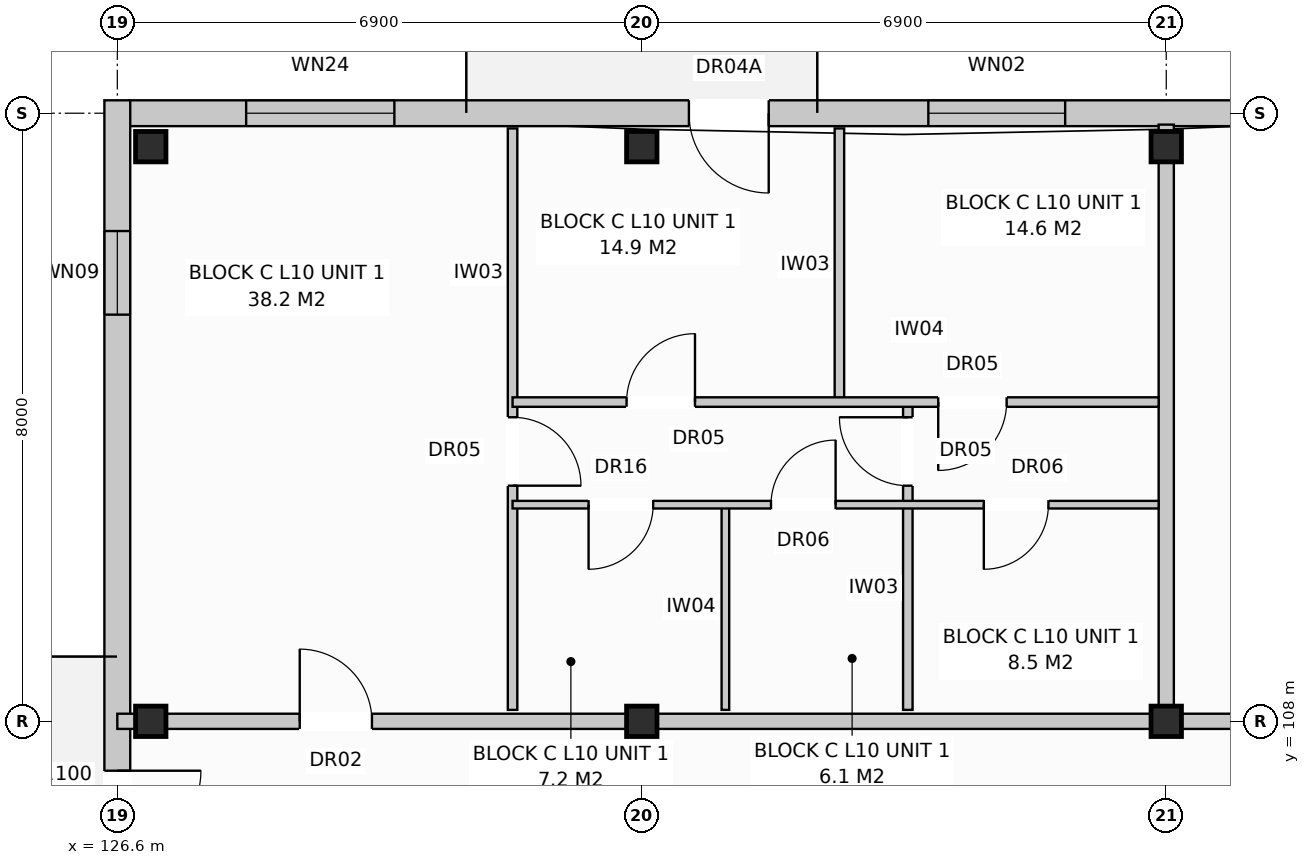
"""IFC4 building model, lengths in metres.
Left out: names, types, materials, properties, quantities, classifications, styles, units other than length and angle.
Written with IfcOpenShell. Run it as: python <this file> out.ifc"""

import sys

from ifc_helpers import new_model, si_unit, direction, frame, frame_2d, origin, origin_with_axes, origin_2d, place, context, subcontext, project, spatial, rectangle, extrude, element, fill, save


model = new_model("IFC4")
c1 = context("Model", 3, precision=1e-05, world=origin(), true_north=direction((0.0, 1.0)))
c2 = subcontext(c1, "Body", "Model", "MODEL_VIEW")
j1 = project(units=[si_unit("LENGTHUNIT", "METRE"), si_unit("PLANEANGLEUNIT", "RADIAN")], contexts=[c1])
p1 = place(None, origin())
s1 = spatial("IfcSite", under=j1, at=p1, CompositionType="ELEMENT")
p2 = place(p1, origin())
s2 = spatial("IfcBuilding", under=s1, at=p2, CompositionType="ELEMENT")
p3 = place(p2, frame((0.0, 0.0, 33.6)))
s3 = spatial("IfcBuildingStorey", under=s2, at=p3, CompositionType="ELEMENT", Elevation=33.6)
for number, where, z_axis, x_axis in (
    (1, (127.04, 108.0, 0.0), (0.0, 0.0, 1.0), (1.0, 0.0, 0.0)),
    (2, (127.04, 115.56, 0.0), (0.0, 0.0, 1.0), (1.0, 0.0, 0.0)),
    (3, (133.5, 108.0, 0.0), (0.0, 0.0, 1.0), (1.0, 0.0, 0.0)),
    (4, (133.5, 115.56, 0.0), (0.0, 0.0, 1.0), (1.0, 0.0, 0.0)),
    (5, (140.4, 108.0, 0.0), (0.0, 0.0, 1.0), (1.0, 0.0, 0.0)),
    (6, (140.4, 115.56, 0.0), (0.0, 0.0, 1.0), (1.0, 0.0, 0.0)),
):
    element("IfcColumn", number, at=place(p3, frame(where, z_axis=z_axis, x_axis=x_axis)), inside=s3, PredefinedType="COLUMN", context=c2, shape_type="SweptSolid", body=[
        extrude(rectangle(XDim=0.4, YDim=0.4, at=origin_2d()), origin(), (0.0, 0.0, 1.0), 3.2),
    ])
p4 = place(p3, frame((126.76, 116.0, 0.0), z_axis=(0.0, 0.0, 1.0), x_axis=(1.0, 0.0, 0.0)))
e7 = element("IfcWall", 7, at=p4, inside=s3, PredefinedType="STANDARD", context=c2, shape_type="SweptSolid", body=[
    extrude(rectangle(XDim=41.08, YDim=0.34, at=frame_2d((20.54, 0.0))), origin(), (0.0, 0.0, 1.0), 2.91),
])
p5 = place(p4, frame((7.36, 0.0, 0.0)))
e8 = element("IfcOpeningElement", 8, at=p5, cuts=e7, PredefinedType="OPENING", context=c2, shape_type="SweptSolid", body=[
    extrude(rectangle(XDim=1.05, YDim=2.12, at=frame_2d((0.525, 1.06))), frame((0.0, 0.182, 0.0), z_axis=(0.0, -1.0, 0.0), x_axis=(1.0, 0.0, 0.0)), (0.0, 0.0, 1.0), 0.364),
])
p6 = place(p4, frame((18.651, 0.0, 0.0)))
e9 = element("IfcOpeningElement", 9, at=p6, cuts=e7, PredefinedType="OPENING", context=c2, shape_type="SweptSolid", body=[
    extrude(rectangle(XDim=1.05, YDim=2.12, at=frame_2d((0.525, 1.06))), frame((0.0, 0.182, 0.0), z_axis=(0.0, -1.0, 0.0), x_axis=(1.0, 0.0, 0.0)), (0.0, 0.0, 1.0), 0.364),
])
p7 = place(p4, frame((32.651, 0.0, 0.0)))
e10 = element("IfcOpeningElement", 10, at=p7, cuts=e7, PredefinedType="OPENING", context=c2, shape_type="SweptSolid", body=[
    extrude(rectangle(XDim=1.05, YDim=2.12, at=frame_2d((0.525, 1.06))), frame((0.0, 0.182, 0.0), z_axis=(0.0, -1.0, 0.0), x_axis=(1.0, 0.0, 0.0)), (0.0, 0.0, 1.0), 0.364),
])
p8 = place(p4, frame((1.535, 0.0, 0.8)))
e11 = element("IfcOpeningElement", 11, at=p8, cuts=e7, PredefinedType="OPENING", context=c2, shape_type="SweptSolid", body=[
    extrude(rectangle(XDim=1.95, YDim=1.65, at=frame_2d((0.975, 0.825))), frame((0.0, 0.182, 0.0), z_axis=(0.0, -1.0, 0.0), x_axis=(1.0, 0.0, 0.0)), (0.0, 0.0, 1.0), 0.364),
])
p9 = place(p4, frame((10.51, 0.0, 0.8)))
e12 = element("IfcOpeningElement", 12, at=p9, cuts=e7, PredefinedType="OPENING", context=c2, shape_type="SweptSolid", body=[
    extrude(rectangle(XDim=1.8, YDim=1.7, at=frame_2d((0.9, 0.85))), frame((0.0, 0.182, 0.0), z_axis=(0.0, -1.0, 0.0), x_axis=(1.0, 0.0, 0.0)), (0.0, 0.0, 1.0), 0.364),
])
p10 = place(p4, frame((15.86, 0.0, 0.8)))
e13 = element("IfcOpeningElement", 13, at=p10, cuts=e7, PredefinedType="OPENING", context=c2, shape_type="SweptSolid", body=[
    extrude(rectangle(XDim=1.9, YDim=1.85, at=frame_2d((0.95, 0.925))), frame((0.0, 0.182, 0.0), z_axis=(0.0, -1.0, 0.0), x_axis=(1.0, 0.0, 0.0)), (0.0, 0.0, 1.0), 0.364),
])
p11 = place(p4, frame((21.96, 0.0, 0.72)))
e14 = element("IfcOpeningElement", 14, at=p11, cuts=e7, PredefinedType="OPENING", context=c2, shape_type="SweptSolid", body=[
    extrude(rectangle(XDim=1.1, YDim=1.5, at=frame_2d((0.55, 0.75))), frame((0.0, 0.182, 0.0), z_axis=(0.0, -1.0, 0.0), x_axis=(1.0, 0.0, 0.0)), (0.0, 0.0, 1.0), 0.364),
])
p12 = place(p4, frame((28.01, 0.0, 0.8)))
e15 = element("IfcOpeningElement", 15, at=p12, cuts=e7, PredefinedType="OPENING", context=c2, shape_type="SweptSolid", body=[
    extrude(rectangle(XDim=1.8, YDim=1.7, at=frame_2d((0.9, 0.85))), frame((0.0, 0.182, 0.0), z_axis=(0.0, -1.0, 0.0), x_axis=(1.0, 0.0, 0.0)), (0.0, 0.0, 1.0), 0.364),
])
p13 = place(p4, frame((30.81, 0.0, 0.85)))
e16 = element("IfcOpeningElement", 16, at=p13, cuts=e7, PredefinedType="OPENING", context=c2, shape_type="SweptSolid", body=[
    extrude(rectangle(XDim=1.5, YDim=1.65, at=frame_2d((0.75, 0.825))), frame((0.0, 0.182, 0.0), z_axis=(0.0, -1.0, 0.0), x_axis=(1.0, 0.0, 0.0)), (0.0, 0.0, 1.0), 0.364),
])
p14 = place(p4, frame((35.76, 0.0, 0.72)))
e17 = element("IfcOpeningElement", 17, at=p14, cuts=e7, PredefinedType="OPENING", context=c2, shape_type="SweptSolid", body=[
    extrude(rectangle(XDim=1.1, YDim=1.5, at=frame_2d((0.55, 0.75))), frame((0.0, 0.182, 0.0), z_axis=(0.0, -1.0, 0.0), x_axis=(1.0, 0.0, 0.0)), (0.0, 0.0, 1.0), 0.364),
])
p15 = place(p4, frame((38.675, 0.0, 0.8)))
e18 = element("IfcOpeningElement", 18, at=p15, cuts=e7, PredefinedType="OPENING", context=c2, shape_type="SweptSolid", body=[
    extrude(rectangle(XDim=1.8, YDim=1.7, at=frame_2d((0.9, 0.85))), frame((0.0, 0.182, 0.0), z_axis=(0.0, -1.0, 0.0), x_axis=(1.0, 0.0, 0.0)), (0.0, 0.0, 1.0), 0.364),
])
p16 = place(p3, frame((126.6, 97.43, 0.0), z_axis=(0.0, 0.0, 1.0), x_axis=(0.0, 1.0, 0.0)))
e19 = element("IfcWall", 19, at=p16, inside=s3, PredefinedType="STANDARD", context=c2, shape_type="SweptSolid", body=[
    extrude(rectangle(XDim=18.74, YDim=0.34, at=frame_2d((9.37, 0.0))), origin(), (0.0, 0.0, 1.0), 2.91),
])
p17 = place(p16, frame((8.82, 0.0, 0.0)))
e20 = element("IfcOpeningElement", 20, at=p17, cuts=e19, PredefinedType="OPENING", context=c2, shape_type="SweptSolid", body=[
    extrude(rectangle(XDim=1.1, YDim=2.1, at=frame_2d((0.55, 1.05))), frame((0.0, 0.182, 0.0), z_axis=(0.0, -1.0, 0.0), x_axis=(1.0, 0.0, 0.0)), (0.0, 0.0, 1.0), 0.364),
])
p18 = place(p16, frame((15.92, 0.0, 0.72)))
e21 = element("IfcOpeningElement", 21, at=p18, cuts=e19, PredefinedType="OPENING", context=c2, shape_type="SweptSolid", body=[
    extrude(rectangle(XDim=1.1, YDim=1.5, at=frame_2d((0.55, 0.75))), frame((0.0, 0.182, 0.0), z_axis=(0.0, -1.0, 0.0), x_axis=(1.0, 0.0, 0.0)), (0.0, 0.0, 1.0), 0.364),
])
p19 = place(p3, frame((140.4, 108.15, 0.0), z_axis=(0.0, 0.0, 1.0), x_axis=(0.0, 1.0, 0.0)))
e22 = element("IfcWall", 22, at=p19, inside=s3, PredefinedType="PARTITIONING", context=c2, shape_type="SweptSolid", body=[
    extrude(rectangle(XDim=7.7, YDim=0.2, at=frame_2d((3.85, 0.0))), origin(), (0.0, 0.0, 1.0), 2.96),
])
p20 = place(p3, frame((126.6, 108.0, 0.0), z_axis=(0.0, 0.0, 1.0), x_axis=(1.0, 0.0, 0.0)))
e23 = element("IfcWall", 23, at=p20, inside=s3, PredefinedType="PARTITIONING", context=c2, shape_type="SweptSolid", body=[
    extrude(rectangle(XDim=13.8, YDim=0.2, at=frame_2d((6.9, 0.0))), origin(), (0.0, 0.0, 1.0), 2.35),
])
p21 = place(p20, frame((2.4, 0.0, 0.0)))
e24 = element("IfcOpeningElement", 24, at=p21, cuts=e23, PredefinedType="OPENING", context=c2, shape_type="SweptSolid", body=[
    extrude(rectangle(XDim=0.95, YDim=2.15, at=frame_2d((0.475, 1.075))), frame((0.0, 0.112, 0.0), z_axis=(0.0, -1.0, 0.0), x_axis=(1.0, 0.0, 0.0)), (0.0, 0.0, 1.0), 0.224),
])
p22 = place(p3, frame((131.8, 108.15, 0.0), z_axis=(0.0, 0.0, 1.0), x_axis=(0.0, 1.0, 0.0)))
e25 = element("IfcWall", 25, at=p22, inside=s3, PredefinedType="PARTITIONING", context=c2, shape_type="SweptSolid", body=[
    extrude(rectangle(XDim=7.65, YDim=0.125, at=frame_2d((3.825, 0.0))), origin(), (0.0, 0.0, 1.0), 2.96),
])
p23 = place(p22, frame((2.95, 0.0, 0.0)))
e26 = element("IfcOpeningElement", 26, at=p23, cuts=e25, PredefinedType="OPENING", context=c2, shape_type="SweptSolid", body=[
    extrude(rectangle(XDim=0.9, YDim=2.1, at=frame_2d((0.45, 1.05))), frame((0.0, 0.074, 0.0), z_axis=(0.0, -1.0, 0.0), x_axis=(1.0, 0.0, 0.0)), (0.0, 0.0, 1.0), 0.149),
])
p24 = place(p3, frame((134.6, 108.15, 0.0), z_axis=(0.0, 0.0, 1.0), x_axis=(0.0, 1.0, 0.0)))
e27 = element("IfcWall", 27, at=p24, inside=s3, PredefinedType="PARTITIONING", context=c2, shape_type="SweptSolid", body=[
    extrude(rectangle(XDim=2.7, YDim=0.1, at=frame_2d((1.35, 0.0))), origin(), (0.0, 0.0, 1.0), 2.59),
])
p25 = place(p3, frame((137.0, 108.15, 0.0), z_axis=(0.0, 0.0, 1.0), x_axis=(0.0, 1.0, 0.0)))
e28 = element("IfcWall", 28, at=p25, inside=s3, PredefinedType="PARTITIONING", context=c2, shape_type="SweptSolid", body=[
    extrude(rectangle(XDim=4.05, YDim=0.125, at=frame_2d((2.025, 0.0))), origin(), (0.0, 0.0, 1.0), 2.96),
])
p26 = place(p25, frame((2.95, 0.0, 0.0)))
e29 = element("IfcOpeningElement", 29, at=p26, cuts=e28, PredefinedType="OPENING", context=c2, shape_type="SweptSolid", body=[
    extrude(rectangle(XDim=0.9, YDim=2.1, at=frame_2d((0.45, 1.05))), frame((0.0, 0.074, 0.0), z_axis=(0.0, -1.0, 0.0), x_axis=(1.0, 0.0, 0.0)), (0.0, 0.0, 1.0), 0.149),
])
p27 = place(p3, frame((136.1, 112.2, 0.0), z_axis=(0.0, 0.0, 1.0), x_axis=(0.0, 1.0, 0.0)))
e30 = element("IfcWall", 30, at=p27, inside=s3, PredefinedType="PARTITIONING", context=c2, shape_type="SweptSolid", body=[
    extrude(rectangle(XDim=3.6, YDim=0.125, at=frame_2d((1.8, 0.0))), origin(), (0.0, 0.0, 1.0), 2.96),
])
p28 = place(p3, frame((131.8, 110.85, 0.0), z_axis=(0.0, 0.0, 1.0), x_axis=(1.0, 0.0, 0.0)))
e31 = element("IfcWall", 31, at=p28, inside=s3, PredefinedType="PARTITIONING", context=c2, shape_type="SweptSolid", body=[
    extrude(rectangle(XDim=8.5, YDim=0.1, at=frame_2d((4.25, 0.0))), origin(), (0.0, 0.0, 1.0), 2.96),
])
p29 = place(p28, frame((1.0, 0.0, 0.0)))
e32 = element("IfcOpeningElement", 32, at=p29, cuts=e31, PredefinedType="OPENING", context=c2, shape_type="SweptSolid", body=[
    extrude(rectangle(XDim=0.85, YDim=2.1, at=frame_2d((0.425, 1.05))), frame((0.0, 0.062, 0.0), z_axis=(0.0, -1.0, 0.0), x_axis=(1.0, 0.0, 0.0)), (0.0, 0.0, 1.0), 0.124),
])
p30 = place(p28, frame((3.4, 0.0, 0.0)))
e33 = element("IfcOpeningElement", 33, at=p30, cuts=e31, PredefinedType="OPENING", context=c2, shape_type="SweptSolid", body=[
    extrude(rectangle(XDim=0.85, YDim=2.05, at=frame_2d((0.425, 1.025))), frame((0.0, 0.062, 0.0), z_axis=(0.0, -1.0, 0.0), x_axis=(1.0, 0.0, 0.0)), (0.0, 0.0, 1.0), 0.124),
])
p31 = place(p28, frame((6.2, 0.0, 0.0)))
e34 = element("IfcOpeningElement", 34, at=p31, cuts=e31, PredefinedType="OPENING", context=c2, shape_type="SweptSolid", body=[
    extrude(rectangle(XDim=0.85, YDim=2.05, at=frame_2d((0.425, 1.025))), frame((0.0, 0.062, 0.0), z_axis=(0.0, -1.0, 0.0), x_axis=(1.0, 0.0, 0.0)), (0.0, 0.0, 1.0), 0.124),
])
p32 = place(p3, frame((131.8, 112.2, 0.0), z_axis=(0.0, 0.0, 1.0), x_axis=(1.0, 0.0, 0.0)))
e35 = element("IfcWall", 35, at=p32, inside=s3, PredefinedType="PARTITIONING", context=c2, shape_type="SweptSolid", body=[
    extrude(rectangle(XDim=8.5, YDim=0.125, at=frame_2d((4.25, 0.0))), origin(), (0.0, 0.0, 1.0), 2.96),
])
p33 = place(p32, frame((1.5, 0.0, 0.0)))
e36 = element("IfcOpeningElement", 36, at=p33, cuts=e35, PredefinedType="OPENING", context=c2, shape_type="SweptSolid", body=[
    extrude(rectangle(XDim=0.9, YDim=2.1, at=frame_2d((0.45, 1.05))), frame((0.0, 0.074, 0.0), z_axis=(0.0, -1.0, 0.0), x_axis=(1.0, 0.0, 0.0)), (0.0, 0.0, 1.0), 0.149),
])
p34 = place(p32, frame((5.6, 0.0, 0.0)))
e37 = element("IfcOpeningElement", 37, at=p34, cuts=e35, PredefinedType="OPENING", context=c2, shape_type="SweptSolid", body=[
    extrude(rectangle(XDim=0.9, YDim=2.1, at=frame_2d((0.45, 1.05))), frame((0.0, 0.074, 0.0), z_axis=(0.0, -1.0, 0.0), x_axis=(1.0, 0.0, 0.0)), (0.0, 0.0, 1.0), 0.149),
])
p35 = place(p3, frame((140.4, 108.0, 0.0), z_axis=(0.0, 0.0, 1.0), x_axis=(1.0, 0.0, 0.0)))
e38 = element("IfcWall", 38, at=p35, inside=s3, PredefinedType="PARTITIONING", context=c2, shape_type="SweptSolid", body=[
    extrude(rectangle(XDim=20.7, YDim=0.2, at=frame_2d((10.35, 0.0))), origin(), (0.0, 0.0, 1.0), 2.35),
])
p36 = place(p35, frame((2.4, 0.0, 0.0)))
e39 = element("IfcOpeningElement", 39, at=p36, cuts=e38, PredefinedType="OPENING", context=c2, shape_type="SweptSolid", body=[
    extrude(rectangle(XDim=0.95, YDim=2.15, at=frame_2d((0.475, 1.075))), frame((0.0, 0.112, 0.0), z_axis=(0.0, -1.0, 0.0), x_axis=(1.0, 0.0, 0.0)), (0.0, 0.0, 1.0), 0.224),
])
p37 = place(p5, frame((1.05, 0.0, 0.0), z_axis=(0.0, 0.0, 1.0), x_axis=(-1.0, 0.0, 0.0)))
e40 = element("IfcDoor", 40, at=p37, inside=s3, OperationType="SINGLE_SWING_RIGHT", PredefinedType="DOOR", context=c2, shape_type="SweptSolid", body=[
    extrude(rectangle(XDim=1.05, YDim=2.12, at=frame_2d((0.525, 1.06))), frame((0.0, 0.025, 0.0), z_axis=(0.0, -1.0, 0.0), x_axis=(1.0, 0.0, 0.0)), (0.0, 0.0, 1.0), 0.05),
])
fill(e8, e40)
p38 = place(p8, origin_with_axes())
e41 = element("IfcWindow", 41, at=p38, inside=s3, PartitioningType="SINGLE_PANEL", PredefinedType="WINDOW", context=c2, shape_type="SweptSolid", body=[
    extrude(rectangle(XDim=1.95, YDim=1.65, at=frame_2d((0.975, 0.825))), frame((0.0, 0.03, 0.0), z_axis=(0.0, -1.0, 0.0), x_axis=(1.0, 0.0, 0.0)), (0.0, 0.0, 1.0), 0.06),
])
fill(e11, e41)
p39 = place(p9, origin_with_axes())
e42 = element("IfcWindow", 42, at=p39, inside=s3, PartitioningType="SINGLE_PANEL", PredefinedType="WINDOW", context=c2, shape_type="SweptSolid", body=[
    extrude(rectangle(XDim=1.8, YDim=1.7, at=frame_2d((0.9, 0.85))), frame((0.0, 0.03, 0.0), z_axis=(0.0, -1.0, 0.0), x_axis=(1.0, 0.0, 0.0)), (0.0, 0.0, 1.0), 0.06),
])
fill(e12, e42)
p40 = place(p17, frame((1.1, 0.0, 0.0), z_axis=(0.0, 0.0, 1.0), x_axis=(-1.0, 0.0, 0.0)))
e43 = element("IfcDoor", 43, at=p40, inside=s3, OperationType="SINGLE_SWING_RIGHT", PredefinedType="DOOR", context=c2, shape_type="SweptSolid", body=[
    extrude(rectangle(XDim=1.1, YDim=2.1, at=frame_2d((0.55, 1.05))), frame((0.0, 0.025, 0.0), z_axis=(0.0, -1.0, 0.0), x_axis=(1.0, 0.0, 0.0)), (0.0, 0.0, 1.0), 0.05),
])
fill(e20, e43)
p41 = place(p18, origin_with_axes())
e44 = element("IfcWindow", 44, at=p41, inside=s3, PartitioningType="SINGLE_PANEL", PredefinedType="WINDOW", context=c2, shape_type="SweptSolid", body=[
    extrude(rectangle(XDim=1.1, YDim=1.5, at=frame_2d((0.55, 0.75))), frame((0.0, 0.03, 0.0), z_axis=(0.0, -1.0, 0.0), x_axis=(1.0, 0.0, 0.0)), (0.0, 0.0, 1.0), 0.06),
])
fill(e21, e44)
p42 = place(p21, origin_with_axes())
e45 = element("IfcDoor", 45, at=p42, inside=s3, OperationType="SINGLE_SWING_LEFT", PredefinedType="DOOR", context=c2, shape_type="SweptSolid", body=[
    extrude(rectangle(XDim=0.95, YDim=2.15, at=frame_2d((0.475, 1.075))), frame((0.0, 0.025, 0.0), z_axis=(0.0, -1.0, 0.0), x_axis=(1.0, 0.0, 0.0)), (0.0, 0.0, 1.0), 0.05),
])
fill(e24, e45)
p43 = place(p23, frame((0.9, 0.0, 0.0), z_axis=(0.0, 0.0, 1.0), x_axis=(-1.0, 0.0, 0.0)))
e46 = element("IfcDoor", 46, at=p43, inside=s3, OperationType="SINGLE_SWING_LEFT", PredefinedType="DOOR", context=c2, shape_type="SweptSolid", body=[
    extrude(rectangle(XDim=0.9, YDim=2.1, at=frame_2d((0.45, 1.05))), frame((0.0, 0.025, 0.0), z_axis=(0.0, -1.0, 0.0), x_axis=(1.0, 0.0, 0.0)), (0.0, 0.0, 1.0), 0.05),
])
fill(e26, e46)
p44 = place(p26, origin_with_axes())
e47 = element("IfcDoor", 47, at=p44, inside=s3, OperationType="SINGLE_SWING_RIGHT", PredefinedType="DOOR", context=c2, shape_type="SweptSolid", body=[
    extrude(rectangle(XDim=0.9, YDim=2.1, at=frame_2d((0.45, 1.05))), frame((0.0, 0.025, 0.0), z_axis=(0.0, -1.0, 0.0), x_axis=(1.0, 0.0, 0.0)), (0.0, 0.0, 1.0), 0.05),
])
fill(e29, e47)
p45 = place(p29, frame((0.85, 0.0, 0.0), z_axis=(0.0, 0.0, 1.0), x_axis=(-1.0, 0.0, 0.0)))
e48 = element("IfcDoor", 48, at=p45, inside=s3, OperationType="SINGLE_SWING_LEFT", PredefinedType="DOOR", context=c2, shape_type="SweptSolid", body=[
    extrude(rectangle(XDim=0.85, YDim=2.1, at=frame_2d((0.425, 1.05))), frame((0.0, 0.025, 0.0), z_axis=(0.0, -1.0, 0.0), x_axis=(1.0, 0.0, 0.0)), (0.0, 0.0, 1.0), 0.05),
])
fill(e32, e48)
p46 = place(p30, origin_with_axes())
e49 = element("IfcDoor", 49, at=p46, inside=s3, OperationType="SINGLE_SWING_RIGHT", PredefinedType="DOOR", context=c2, shape_type="SweptSolid", body=[
    extrude(rectangle(XDim=0.85, YDim=2.05, at=frame_2d((0.425, 1.025))), frame((0.0, 0.025, 0.0), z_axis=(0.0, -1.0, 0.0), x_axis=(1.0, 0.0, 0.0)), (0.0, 0.0, 1.0), 0.05),
])
fill(e33, e49)
p47 = place(p31, frame((0.85, 0.0, 0.0), z_axis=(0.0, 0.0, 1.0), x_axis=(-1.0, 0.0, 0.0)))
e50 = element("IfcDoor", 50, at=p47, inside=s3, OperationType="SINGLE_SWING_LEFT", PredefinedType="DOOR", context=c2, shape_type="SweptSolid", body=[
    extrude(rectangle(XDim=0.85, YDim=2.05, at=frame_2d((0.425, 1.025))), frame((0.0, 0.025, 0.0), z_axis=(0.0, -1.0, 0.0), x_axis=(1.0, 0.0, 0.0)), (0.0, 0.0, 1.0), 0.05),
])
fill(e34, e50)
p48 = place(p33, origin_with_axes())
e51 = element("IfcDoor", 51, at=p48, inside=s3, OperationType="SINGLE_SWING_RIGHT", PredefinedType="DOOR", context=c2, shape_type="SweptSolid", body=[
    extrude(rectangle(XDim=0.9, YDim=2.1, at=frame_2d((0.45, 1.05))), frame((0.0, 0.025, 0.0), z_axis=(0.0, -1.0, 0.0), x_axis=(1.0, 0.0, 0.0)), (0.0, 0.0, 1.0), 0.05),
])
fill(e36, e51)
p49 = place(p34, frame((0.9, 0.0, 0.0), z_axis=(0.0, 0.0, 1.0), x_axis=(-1.0, 0.0, 0.0)))
e52 = element("IfcDoor", 52, at=p49, inside=s3, OperationType="SINGLE_SWING_LEFT", PredefinedType="DOOR", context=c2, shape_type="SweptSolid", body=[
    extrude(rectangle(XDim=0.9, YDim=2.1, at=frame_2d((0.45, 1.05))), frame((0.0, 0.025, 0.0), z_axis=(0.0, -1.0, 0.0), x_axis=(1.0, 0.0, 0.0)), (0.0, 0.0, 1.0), 0.05),
])
fill(e37, e52)
save(model, sys.argv[1])
